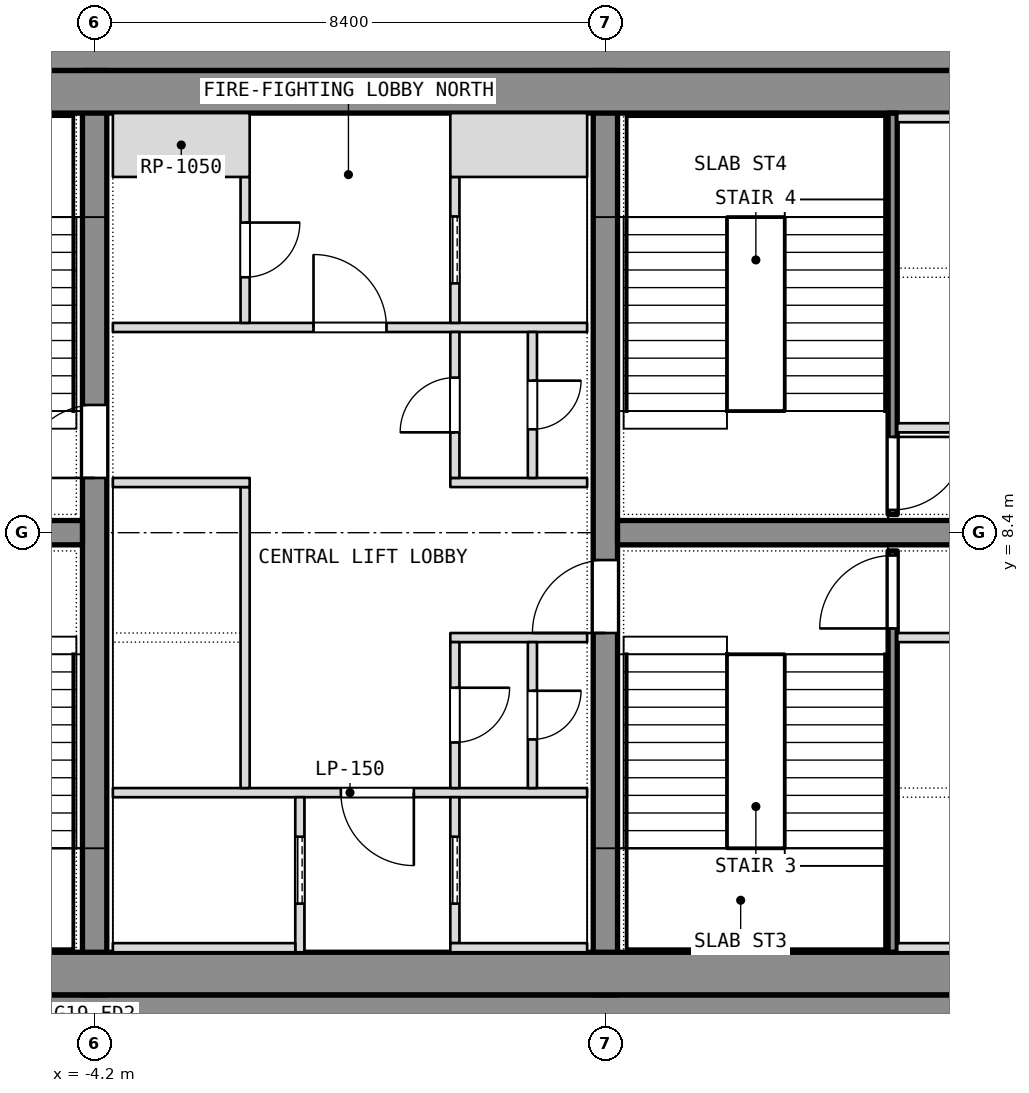
"""IFC4 building model, lengths in metres.
Left out: names, types, materials, properties, quantities, classifications, styles, units other than length and angle.
Written with IfcOpenShell. Run it as: python <this file> out.ifc"""

import sys

from ifc_helpers import new_model, si_unit, direction, frame, frame_2d, origin, place, context, subcontext, project, spatial, rectangle, extrude, element, fill, save


model = new_model("IFC4")
c1 = context("Model", 3, precision=1e-05, world=origin(), true_north=direction((0.0, 1.0)))
c2 = subcontext(c1, "Body", "Model", "MODEL_VIEW")
j1 = project(units=[si_unit("LENGTHUNIT", "METRE"), si_unit("PLANEANGLEUNIT", "RADIAN")], contexts=[c1])
p1 = place(None, origin())
s1 = spatial("IfcSite", under=j1, at=p1, CompositionType="ELEMENT")
p2 = place(p1, origin())
s2 = spatial("IfcBuilding", under=s1, at=p2, CompositionType="ELEMENT")
p3 = place(p2, frame((0.0, 0.0, 223.7)))
s3 = spatial("IfcBuildingStorey", under=s2, at=p3, CompositionType="ELEMENT", Elevation=223.7)
for number, where, z_axis, x_axis in (
    (1, (-11.1, 0.4, 0.0), (0.0, 0.0, 1.0), (1.0, 0.0, 0.0)),
    (2, (-11.1, 16.4, 0.0), (0.0, 0.0, 1.0), (1.0, 0.0, 0.0)),
):
    element("IfcWall", number, at=place(p3, frame(where, z_axis=z_axis, x_axis=x_axis)), inside=s3, PredefinedType="SHEAR", context=c2, shape_type="SweptSolid", body=[
        extrude(rectangle(XDim=22.2, YDim=0.8, at=frame_2d((11.1, 0.0))), origin(), (0.0, 0.0, 1.0), 3.6),
    ])
p4 = place(p3, frame((-4.2, 0.8, 0.0), z_axis=(0.0, 0.0, 1.0), x_axis=(0.0, 1.0, 0.0)))
e3 = element("IfcWall", 3, at=p4, inside=s3, PredefinedType="SHEAR", context=c2, shape_type="SweptSolid", body=[
    extrude(rectangle(XDim=15.2, YDim=0.4, at=frame_2d((7.6, 0.0))), origin(), (0.0, 0.0, 1.0), 3.6),
])
p5 = place(p4, frame((8.5, 0.0, 0.0)))
e4 = element("IfcOpeningElement", 4, at=p5, cuts=e3, PredefinedType="OPENING", context=c2, shape_type="SweptSolid", body=[
    extrude(rectangle(XDim=1.2, YDim=2.1, at=frame_2d((0.6, 1.05))), frame((0.0, 0.2, 0.0), z_axis=(0.0, -1.0, 0.0), x_axis=(1.0, 0.0, 0.0)), (0.0, 0.0, 1.0), 0.4),
])
p6 = place(p3, frame((4.2, 0.8, 0.0), z_axis=(0.0, 0.0, 1.0), x_axis=(0.0, 1.0, 0.0)))
e5 = element("IfcWall", 5, at=p6, inside=s3, PredefinedType="SHEAR", context=c2, shape_type="SweptSolid", body=[
    extrude(rectangle(XDim=15.2, YDim=0.4, at=frame_2d((7.6, 0.0))), origin(), (0.0, 0.0, 1.0), 3.6),
])
p7 = place(p6, frame((5.95, 0.0, 0.0)))
e6 = element("IfcOpeningElement", 6, at=p7, cuts=e5, PredefinedType="OPENING", context=c2, shape_type="SweptSolid", body=[
    extrude(rectangle(XDim=1.2, YDim=2.1, at=frame_2d((0.6, 1.05))), frame((0.0, 0.2, 0.0), z_axis=(0.0, -1.0, 0.0), x_axis=(1.0, 0.0, 0.0)), (0.0, 0.0, 1.0), 0.4),
])
for number, where, z_axis, x_axis in (
    (7, (-11.1, 8.4, 0.0), (0.0, 0.0, 1.0), (1.0, 0.0, 0.0)),
    (8, (4.4, 8.4, 0.0), (0.0, 0.0, 1.0), (1.0, 0.0, 0.0)),
):
    element("IfcWall", number, at=place(p3, frame(where, z_axis=z_axis, x_axis=x_axis)), inside=s3, PredefinedType="SHEAR", context=c2, shape_type="SweptSolid", body=[
        extrude(rectangle(XDim=6.7, YDim=0.4, at=frame_2d((3.35, 0.0))), origin(), (0.0, 0.0, 1.0), 3.6),
    ])
for number, where, z_axis, x_axis in (
    (9, (-11.1, 1.15, 0.0), (0.0, 0.0, 1.0), (1.0, 0.0, 0.0)),
    (10, (-11.1, 15.65, 0.0), (0.0, 0.0, 1.0), (1.0, 0.0, 0.0)),
):
    element("IfcWall", number, at=place(p3, frame(where, z_axis=z_axis, x_axis=x_axis)), inside=s3, PredefinedType="PARTITIONING", context=c2, shape_type="SweptSolid", body=[
        extrude(rectangle(XDim=22.2, YDim=0.7, at=frame_2d((11.1, 0.0))), origin(), (0.0, 0.0, 1.0), 3.34),
    ])
p8 = place(p3, frame((8.925, 1.5, 0.0), z_axis=(0.0, 0.0, 1.0), x_axis=(0.0, 1.0, 0.0)))
e11 = element("IfcWall", 11, at=p8, inside=s3, PredefinedType="SHEAR", context=c2, shape_type="SweptSolid", body=[
    extrude(rectangle(XDim=6.6, YDim=0.15, at=frame_2d((3.3, 0.0))), origin(), (0.0, 0.0, 1.0), 3.34),
])
p9 = place(p8, frame((5.325, 0.0, 0.0)))
e12 = element("IfcOpeningElement", 12, at=p9, cuts=e11, PredefinedType="OPENING", context=c2, shape_type="SweptSolid", body=[
    extrude(rectangle(XDim=1.2, YDim=2.1, at=frame_2d((0.6, 1.05))), frame((0.0, 0.075, 0.0), z_axis=(0.0, -1.0, 0.0), x_axis=(1.0, 0.0, 0.0)), (0.0, 0.0, 1.0), 0.15),
])
for number, where, z_axis, x_axis in (
    (13, (9.0, 6.675, 0.0), (0.0, 0.0, 1.0), (1.0, 0.0, 0.0)),
    (14, (9.0, 1.575, 0.0), (0.0, 0.0, 1.0), (1.0, 0.0, 0.0)),
):
    element("IfcWall", number, at=place(p3, frame(where, z_axis=z_axis, x_axis=x_axis)), inside=s3, PredefinedType="SHEAR", context=c2, shape_type="SweptSolid", body=[
        extrude(rectangle(XDim=2.1, YDim=0.15, at=frame_2d((1.05, 0.0))), origin(), (0.0, 0.0, 1.0), 3.6),
    ])
p10 = place(p3, frame((8.925, 8.7, 0.0), z_axis=(0.0, 0.0, 1.0), x_axis=(0.0, 1.0, 0.0)))
e15 = element("IfcWall", 15, at=p10, inside=s3, PredefinedType="SHEAR", context=c2, shape_type="SweptSolid", body=[
    extrude(rectangle(XDim=6.6, YDim=0.15, at=frame_2d((3.3, 0.0))), origin(), (0.0, 0.0, 1.0), 3.34),
])
p11 = place(p10, frame((0.075, 0.0, 0.0)))
e16 = element("IfcOpeningElement", 16, at=p11, cuts=e15, PredefinedType="OPENING", context=c2, shape_type="SweptSolid", body=[
    extrude(rectangle(XDim=1.2, YDim=2.1, at=frame_2d((0.6, 1.05))), frame((0.0, 0.075, 0.0), z_axis=(0.0, -1.0, 0.0), x_axis=(1.0, 0.0, 0.0)), (0.0, 0.0, 1.0), 0.15),
])
for number, where, z_axis, x_axis in (
    (17, (9.0, 10.125, 0.0), (0.0, 0.0, 1.0), (1.0, 0.0, 0.0)),
    (18, (9.0, 15.225, 0.0), (0.0, 0.0, 1.0), (1.0, 0.0, 0.0)),
):
    element("IfcWall", number, at=place(p3, frame(where, z_axis=z_axis, x_axis=x_axis)), inside=s3, PredefinedType="SHEAR", context=c2, shape_type="SweptSolid", body=[
        extrude(rectangle(XDim=2.1, YDim=0.15, at=frame_2d((1.05, 0.0))), origin(), (0.0, 0.0, 1.0), 3.6),
    ])
p12 = place(p3, frame((-3.9, 4.125, 0.0), z_axis=(0.0, 0.0, 1.0), x_axis=(1.0, 0.0, 0.0)))
e19 = element("IfcWall", 19, at=p12, inside=s3, PredefinedType="PARTITIONING", context=c2, shape_type="SweptSolid", body=[
    extrude(rectangle(XDim=7.8, YDim=0.15, at=frame_2d((3.9, 0.0))), origin(), (0.0, 0.0, 1.0), 3.34),
])
p13 = place(p12, frame((3.75, 0.0, 0.0)))
e20 = element("IfcOpeningElement", 20, at=p13, cuts=e19, PredefinedType="OPENING", context=c2, shape_type="SweptSolid", body=[
    extrude(rectangle(XDim=1.2, YDim=2.1, at=frame_2d((0.6, 1.05))), frame((0.0, 0.075, 0.0), z_axis=(0.0, -1.0, 0.0), x_axis=(1.0, 0.0, 0.0)), (0.0, 0.0, 1.0), 0.15),
])
p14 = place(p3, frame((-3.9, 11.775, 0.0), z_axis=(0.0, 0.0, 1.0), x_axis=(1.0, 0.0, 0.0)))
e21 = element("IfcWall", 21, at=p14, inside=s3, PredefinedType="PARTITIONING", context=c2, shape_type="SweptSolid", body=[
    extrude(rectangle(XDim=7.8, YDim=0.15, at=frame_2d((3.9, 0.0))), origin(), (0.0, 0.0, 1.0), 3.34),
])
p15 = place(p14, frame((3.3, 0.0, 0.0)))
e22 = element("IfcOpeningElement", 22, at=p15, cuts=e21, PredefinedType="OPENING", context=c2, shape_type="SweptSolid", body=[
    extrude(rectangle(XDim=1.2, YDim=2.1, at=frame_2d((0.6, 1.05))), frame((0.0, 0.075, 0.0), z_axis=(0.0, -1.0, 0.0), x_axis=(1.0, 0.0, 0.0)), (0.0, 0.0, 1.0), 0.15),
])
p16 = place(p3, frame((-0.825, 1.5, 0.0), z_axis=(0.0, 0.0, 1.0), x_axis=(0.0, 1.0, 0.0)))
e23 = element("IfcWall", 23, at=p16, inside=s3, PredefinedType="SHEAR", context=c2, shape_type="SweptSolid", body=[
    extrude(rectangle(XDim=2.55, YDim=0.15, at=frame_2d((1.275, 0.0))), origin(), (0.0, 0.0, 1.0), 3.6),
])
p17 = place(p16, frame((0.8, 0.0, 0.0)))
e24 = element("IfcOpeningElement", 24, at=p17, cuts=e23, PredefinedType="OPENING", context=c2, shape_type="SweptSolid", body=[
    extrude(rectangle(XDim=1.1, YDim=2.1, at=frame_2d((0.55, 1.05))), frame((0.0, 0.075, 0.0), z_axis=(0.0, -1.0, 0.0), x_axis=(1.0, 0.0, 0.0)), (0.0, 0.0, 1.0), 0.15),
])
p18 = place(p3, frame((-3.9, 1.575, 0.0), z_axis=(0.0, 0.0, 1.0), x_axis=(1.0, 0.0, 0.0)))
e25 = element("IfcWall", 25, at=p18, inside=s3, PredefinedType="SHEAR", context=c2, shape_type="SweptSolid", body=[
    extrude(rectangle(XDim=3.0, YDim=0.15, at=frame_2d((1.5, 0.0))), origin(), (0.0, 0.0, 1.0), 3.6),
])
p19 = place(p3, frame((-1.725, 4.2, 0.0), z_axis=(0.0, 0.0, 1.0), x_axis=(0.0, 1.0, 0.0)))
e26 = element("IfcWall", 26, at=p19, inside=s3, PredefinedType="SHEAR", context=c2, shape_type="SweptSolid", body=[
    extrude(rectangle(XDim=4.95, YDim=0.15, at=frame_2d((2.475, 0.0))), origin(), (0.0, 0.0, 1.0), 3.6),
])
p20 = place(p3, frame((-3.9, 9.225, 0.0), z_axis=(0.0, 0.0, 1.0), x_axis=(1.0, 0.0, 0.0)))
e27 = element("IfcWall", 27, at=p20, inside=s3, PredefinedType="SHEAR", context=c2, shape_type="SweptSolid", body=[
    extrude(rectangle(XDim=2.25, YDim=0.15, at=frame_2d((1.125, 0.0))), origin(), (0.0, 0.0, 1.0), 3.6),
])
p21 = place(p3, frame((-1.725, 11.85, 0.0), z_axis=(0.0, 0.0, 1.0), x_axis=(0.0, 1.0, 0.0)))
e28 = element("IfcWall", 28, at=p21, inside=s3, PredefinedType="PARTITIONING", context=c2, shape_type="SweptSolid", body=[
    extrude(rectangle(XDim=2.4, YDim=0.15, at=frame_2d((1.2, 0.0))), origin(), (0.0, 0.0, 1.0), 3.34),
])
p22 = place(p21, frame((0.75, 0.0, 0.0)))
e29 = element("IfcOpeningElement", 29, at=p22, cuts=e28, PredefinedType="OPENING", context=c2, shape_type="SweptSolid", body=[
    extrude(rectangle(XDim=0.9, YDim=2.1, at=frame_2d((0.45, 1.05))), frame((0.0, 0.075, 0.0), z_axis=(0.0, -1.0, 0.0), x_axis=(1.0, 0.0, 0.0)), (0.0, 0.0, 1.0), 0.15),
])
p23 = place(p3, frame((-3.9, 14.775, 0.0), z_axis=(0.0, 0.0, 1.0), x_axis=(1.0, 0.0, 0.0)))
e30 = element("IfcWall", 30, at=p23, inside=s3, PredefinedType="PARTITIONING", context=c2, shape_type="SweptSolid", body=[
    extrude(rectangle(XDim=2.25, YDim=1.05, at=frame_2d((1.125, 0.0))), origin(), (0.0, 0.0, 1.0), 3.34),
])
p24 = place(p3, frame((1.725, 1.65, 0.0), z_axis=(0.0, 0.0, 1.0), x_axis=(0.0, 1.0, 0.0)))
e31 = element("IfcWall", 31, at=p24, inside=s3, PredefinedType="SHEAR", context=c2, shape_type="SweptSolid", body=[
    extrude(rectangle(XDim=2.4, YDim=0.15, at=frame_2d((1.2, 0.0))), origin(), (0.0, 0.0, 1.0), 3.6),
])
p25 = place(p24, frame((0.65, 0.0, 0.0)))
e32 = element("IfcOpeningElement", 32, at=p25, cuts=e31, PredefinedType="OPENING", context=c2, shape_type="SweptSolid", body=[
    extrude(rectangle(XDim=1.1, YDim=2.1, at=frame_2d((0.55, 1.05))), frame((0.0, 0.075, 0.0), z_axis=(0.0, -1.0, 0.0), x_axis=(1.0, 0.0, 0.0)), (0.0, 0.0, 1.0), 0.15),
])
p26 = place(p3, frame((1.65, 1.575, 0.0), z_axis=(0.0, 0.0, 1.0), x_axis=(1.0, 0.0, 0.0)))
e33 = element("IfcWall", 33, at=p26, inside=s3, PredefinedType="SHEAR", context=c2, shape_type="SweptSolid", body=[
    extrude(rectangle(XDim=2.25, YDim=0.15, at=frame_2d((1.125, 0.0))), origin(), (0.0, 0.0, 1.0), 3.6),
])
p27 = place(p3, frame((1.725, 11.85, 0.0), z_axis=(0.0, 0.0, 1.0), x_axis=(0.0, 1.0, 0.0)))
e34 = element("IfcWall", 34, at=p27, inside=s3, PredefinedType="SHEAR", context=c2, shape_type="SweptSolid", body=[
    extrude(rectangle(XDim=2.4, YDim=0.15, at=frame_2d((1.2, 0.0))), origin(), (0.0, 0.0, 1.0), 3.6),
])
p28 = place(p27, frame((0.65, 0.0, 0.0)))
e35 = element("IfcOpeningElement", 35, at=p28, cuts=e34, PredefinedType="OPENING", context=c2, shape_type="SweptSolid", body=[
    extrude(rectangle(XDim=1.1, YDim=2.1, at=frame_2d((0.55, 1.05))), frame((0.0, 0.075, 0.0), z_axis=(0.0, -1.0, 0.0), x_axis=(1.0, 0.0, 0.0)), (0.0, 0.0, 1.0), 0.15),
])
p29 = place(p3, frame((1.65, 14.775, 0.0), z_axis=(0.0, 0.0, 1.0), x_axis=(1.0, 0.0, 0.0)))
e36 = element("IfcWall", 36, at=p29, inside=s3, PredefinedType="SHEAR", context=c2, shape_type="SweptSolid", body=[
    extrude(rectangle(XDim=2.25, YDim=1.05, at=frame_2d((1.125, 0.0))), origin(), (0.0, 0.0, 1.0), 3.6),
])
for number, where, z_axis, x_axis in (
    (37, (1.65, 6.675, 0.0), (0.0, 0.0, 1.0), (1.0, 0.0, 0.0)),
    (38, (1.65, 9.225, 0.0), (0.0, 0.0, 1.0), (1.0, 0.0, 0.0)),
):
    element("IfcWall", number, at=place(p3, frame(where, z_axis=z_axis, x_axis=x_axis)), inside=s3, PredefinedType="PARTITIONING", context=c2, shape_type="SweptSolid", body=[
        extrude(rectangle(XDim=2.25, YDim=0.15, at=frame_2d((1.125, 0.0))), origin(), (0.0, 0.0, 1.0), 3.34),
    ])
p30 = place(p3, frame((1.725, 4.2, 0.0), z_axis=(0.0, 0.0, 1.0), x_axis=(0.0, 1.0, 0.0)))
e39 = element("IfcWall", 39, at=p30, inside=s3, PredefinedType="PARTITIONING", context=c2, shape_type="SweptSolid", body=[
    extrude(rectangle(XDim=2.4, YDim=0.15, at=frame_2d((1.2, 0.0))), origin(), (0.0, 0.0, 1.0), 3.34),
])
p31 = place(p30, frame((0.75, 0.0, 0.0)))
e40 = element("IfcOpeningElement", 40, at=p31, cuts=e39, PredefinedType="OPENING", context=c2, shape_type="SweptSolid", body=[
    extrude(rectangle(XDim=0.9, YDim=2.1, at=frame_2d((0.45, 1.05))), frame((0.0, 0.075, 0.0), z_axis=(0.0, -1.0, 0.0), x_axis=(1.0, 0.0, 0.0)), (0.0, 0.0, 1.0), 0.15),
])
p32 = place(p3, frame((1.725, 9.3, 0.0), z_axis=(0.0, 0.0, 1.0), x_axis=(0.0, 1.0, 0.0)))
e41 = element("IfcWall", 41, at=p32, inside=s3, PredefinedType="PARTITIONING", context=c2, shape_type="SweptSolid", body=[
    extrude(rectangle(XDim=2.4, YDim=0.15, at=frame_2d((1.2, 0.0))), origin(), (0.0, 0.0, 1.0), 3.34),
])
p33 = place(p32, frame((0.75, 0.0, 0.0)))
e42 = element("IfcOpeningElement", 42, at=p33, cuts=e41, PredefinedType="OPENING", context=c2, shape_type="SweptSolid", body=[
    extrude(rectangle(XDim=0.9, YDim=2.1, at=frame_2d((0.45, 1.05))), frame((0.0, 0.075, 0.0), z_axis=(0.0, -1.0, 0.0), x_axis=(1.0, 0.0, 0.0)), (0.0, 0.0, 1.0), 0.15),
])
p34 = place(p3, frame((3.0, 4.2, 0.0), z_axis=(0.0, 0.0, 1.0), x_axis=(0.0, 1.0, 0.0)))
e43 = element("IfcWall", 43, at=p34, inside=s3, PredefinedType="PARTITIONING", context=c2, shape_type="SweptSolid", body=[
    extrude(rectangle(XDim=2.4, YDim=0.15, at=frame_2d((1.2, 0.0))), origin(), (0.0, 0.0, 1.0), 3.34),
])
p35 = place(p34, frame((0.8, 0.0, 0.0)))
e44 = element("IfcOpeningElement", 44, at=p35, cuts=e43, PredefinedType="OPENING", context=c2, shape_type="SweptSolid", body=[
    extrude(rectangle(XDim=0.8, YDim=2.1, at=frame_2d((0.4, 1.05))), frame((0.0, 0.075, 0.0), z_axis=(0.0, -1.0, 0.0), x_axis=(1.0, 0.0, 0.0)), (0.0, 0.0, 1.0), 0.15),
])
p36 = place(p3, frame((3.0, 9.3, 0.0), z_axis=(0.0, 0.0, 1.0), x_axis=(0.0, 1.0, 0.0)))
e45 = element("IfcWall", 45, at=p36, inside=s3, PredefinedType="PARTITIONING", context=c2, shape_type="SweptSolid", body=[
    extrude(rectangle(XDim=2.4, YDim=0.15, at=frame_2d((1.2, 0.0))), origin(), (0.0, 0.0, 1.0), 3.34),
])
p37 = place(p36, frame((0.8, 0.0, 0.0)))
e46 = element("IfcOpeningElement", 46, at=p37, cuts=e45, PredefinedType="OPENING", context=c2, shape_type="SweptSolid", body=[
    extrude(rectangle(XDim=0.8, YDim=2.1, at=frame_2d((0.4, 1.05))), frame((0.0, 0.075, 0.0), z_axis=(0.0, -1.0, 0.0), x_axis=(1.0, 0.0, 0.0)), (0.0, 0.0, 1.0), 0.15),
])
p38 = place(p9, origin())
e47 = element("IfcDoor", 47, at=p38, inside=s3, OperationType="SINGLE_SWING_LEFT", PredefinedType="DOOR", context=c2, shape_type="SweptSolid", body=[
    extrude(rectangle(XDim=1.2, YDim=2.1, at=frame_2d((0.6, 1.05))), frame((0.0, 0.025, 0.0), z_axis=(0.0, -1.0, 0.0), x_axis=(1.0, 0.0, 0.0)), (0.0, 0.0, 1.0), 0.05),
])
fill(e12, e47)
p39 = place(p11, origin())
e48 = element("IfcDoor", 48, at=p39, inside=s3, OperationType="SINGLE_SWING_LEFT", PredefinedType="DOOR", context=c2, shape_type="SweptSolid", body=[
    extrude(rectangle(XDim=1.2, YDim=2.1, at=frame_2d((0.6, 1.05))), frame((0.0, 0.025, 0.0), z_axis=(0.0, -1.0, 0.0), x_axis=(1.0, 0.0, 0.0)), (0.0, 0.0, 1.0), 0.05),
])
fill(e16, e48)
p40 = place(p31, origin())
e49 = element("IfcDoor", 49, at=p40, inside=s3, OperationType="SINGLE_SWING_LEFT", PredefinedType="DOOR", context=c2, shape_type="SweptSolid", body=[
    extrude(rectangle(XDim=0.9, YDim=2.1, at=frame_2d((0.45, 1.05))), frame((0.0, 0.025, 0.0), z_axis=(0.0, -1.0, 0.0), x_axis=(1.0, 0.0, 0.0)), (0.0, 0.0, 1.0), 0.05),
])
fill(e40, e49)
p41 = place(p35, origin())
e50 = element("IfcDoor", 50, at=p41, inside=s3, OperationType="SINGLE_SWING_LEFT", PredefinedType="DOOR", context=c2, shape_type="SweptSolid", body=[
    extrude(rectangle(XDim=0.8, YDim=2.1, at=frame_2d((0.4, 1.05))), frame((0.0, 0.025, 0.0), z_axis=(0.0, -1.0, 0.0), x_axis=(1.0, 0.0, 0.0)), (0.0, 0.0, 1.0), 0.05),
])
fill(e44, e50)
p42 = place(p33, origin())
e51 = element("IfcDoor", 51, at=p42, inside=s3, OperationType="SINGLE_SWING_LEFT", PredefinedType="DOOR", context=c2, shape_type="SweptSolid", body=[
    extrude(rectangle(XDim=0.9, YDim=2.1, at=frame_2d((0.45, 1.05))), frame((0.0, 0.025, 0.0), z_axis=(0.0, -1.0, 0.0), x_axis=(1.0, 0.0, 0.0)), (0.0, 0.0, 1.0), 0.05),
])
fill(e42, e51)
p43 = place(p37, origin())
e52 = element("IfcDoor", 52, at=p43, inside=s3, OperationType="SINGLE_SWING_LEFT", PredefinedType="DOOR", context=c2, shape_type="SweptSolid", body=[
    extrude(rectangle(XDim=0.8, YDim=2.1, at=frame_2d((0.4, 1.05))), frame((0.0, 0.025, 0.0), z_axis=(0.0, -1.0, 0.0), x_axis=(1.0, 0.0, 0.0)), (0.0, 0.0, 1.0), 0.05),
])
fill(e46, e52)
p44 = place(p17, origin())
e53 = element("IfcDoor", 53, at=p44, inside=s3, OperationType="SLIDING_TO_LEFT", PredefinedType="DOOR", context=c2, shape_type="SweptSolid", body=[
    extrude(rectangle(XDim=1.1, YDim=2.1, at=frame_2d((0.55, 1.05))), frame((0.0, 0.025, 0.0), z_axis=(0.0, -1.0, 0.0), x_axis=(1.0, 0.0, 0.0)), (0.0, 0.0, 1.0), 0.05),
])
fill(e24, e53)
p45 = place(p25, origin())
e54 = element("IfcDoor", 54, at=p45, inside=s3, OperationType="SLIDING_TO_LEFT", PredefinedType="DOOR", context=c2, shape_type="SweptSolid", body=[
    extrude(rectangle(XDim=1.1, YDim=2.1, at=frame_2d((0.55, 1.05))), frame((0.0, 0.025, 0.0), z_axis=(0.0, -1.0, 0.0), x_axis=(1.0, 0.0, 0.0)), (0.0, 0.0, 1.0), 0.05),
])
fill(e32, e54)
p46 = place(p28, origin())
e55 = element("IfcDoor", 55, at=p46, inside=s3, OperationType="SLIDING_TO_LEFT", PredefinedType="DOOR", context=c2, shape_type="SweptSolid", body=[
    extrude(rectangle(XDim=1.1, YDim=2.1, at=frame_2d((0.55, 1.05))), frame((0.0, 0.025, 0.0), z_axis=(0.0, -1.0, 0.0), x_axis=(1.0, 0.0, 0.0)), (0.0, 0.0, 1.0), 0.05),
])
fill(e35, e55)
p47 = place(p13, origin())
e56 = element("IfcDoor", 56, at=p47, inside=s3, OperationType="SINGLE_SWING_LEFT", PredefinedType="DOOR", context=c2, shape_type="SweptSolid", body=[
    extrude(rectangle(XDim=1.2, YDim=2.1, at=frame_2d((0.6, 1.05))), frame((0.0, 0.025, 0.0), z_axis=(0.0, -1.0, 0.0), x_axis=(1.0, 0.0, 0.0)), (0.0, 0.0, 1.0), 0.05),
])
fill(e20, e56)
p48 = place(p15, origin())
e57 = element("IfcDoor", 57, at=p48, inside=s3, OperationType="SINGLE_SWING_LEFT", PredefinedType="DOOR", context=c2, shape_type="SweptSolid", body=[
    extrude(rectangle(XDim=1.2, YDim=2.1, at=frame_2d((0.6, 1.05))), frame((0.0, 0.025, 0.0), z_axis=(0.0, -1.0, 0.0), x_axis=(1.0, 0.0, 0.0)), (0.0, 0.0, 1.0), 0.05),
])
fill(e22, e57)
p49 = place(p22, origin())
e58 = element("IfcDoor", 58, at=p49, inside=s3, OperationType="SINGLE_SWING_LEFT", PredefinedType="DOOR", context=c2, shape_type="SweptSolid", body=[
    extrude(rectangle(XDim=0.9, YDim=2.1, at=frame_2d((0.45, 1.05))), frame((0.0, 0.025, 0.0), z_axis=(0.0, -1.0, 0.0), x_axis=(1.0, 0.0, 0.0)), (0.0, 0.0, 1.0), 0.05),
])
fill(e29, e58)
p50 = place(p5, origin())
e59 = element("IfcDoor", 59, at=p50, inside=s3, OperationType="SINGLE_SWING_LEFT", PredefinedType="DOOR", context=c2, shape_type="SweptSolid", body=[
    extrude(rectangle(XDim=1.2, YDim=2.1, at=frame_2d((0.6, 1.05))), frame((0.0, 0.025, 0.0), z_axis=(0.0, -1.0, 0.0), x_axis=(1.0, 0.0, 0.0)), (0.0, 0.0, 1.0), 0.05),
])
fill(e4, e59)
p51 = place(p7, origin())
e60 = element("IfcDoor", 60, at=p51, inside=s3, OperationType="SINGLE_SWING_LEFT", PredefinedType="DOOR", context=c2, shape_type="SweptSolid", body=[
    extrude(rectangle(XDim=1.2, YDim=2.1, at=frame_2d((0.6, 1.05))), frame((0.0, 0.025, 0.0), z_axis=(0.0, -1.0, 0.0), x_axis=(1.0, 0.0, 0.0)), (0.0, 0.0, 1.0), 0.05),
])
fill(e6, e60)
save(model, sys.argv[1])
